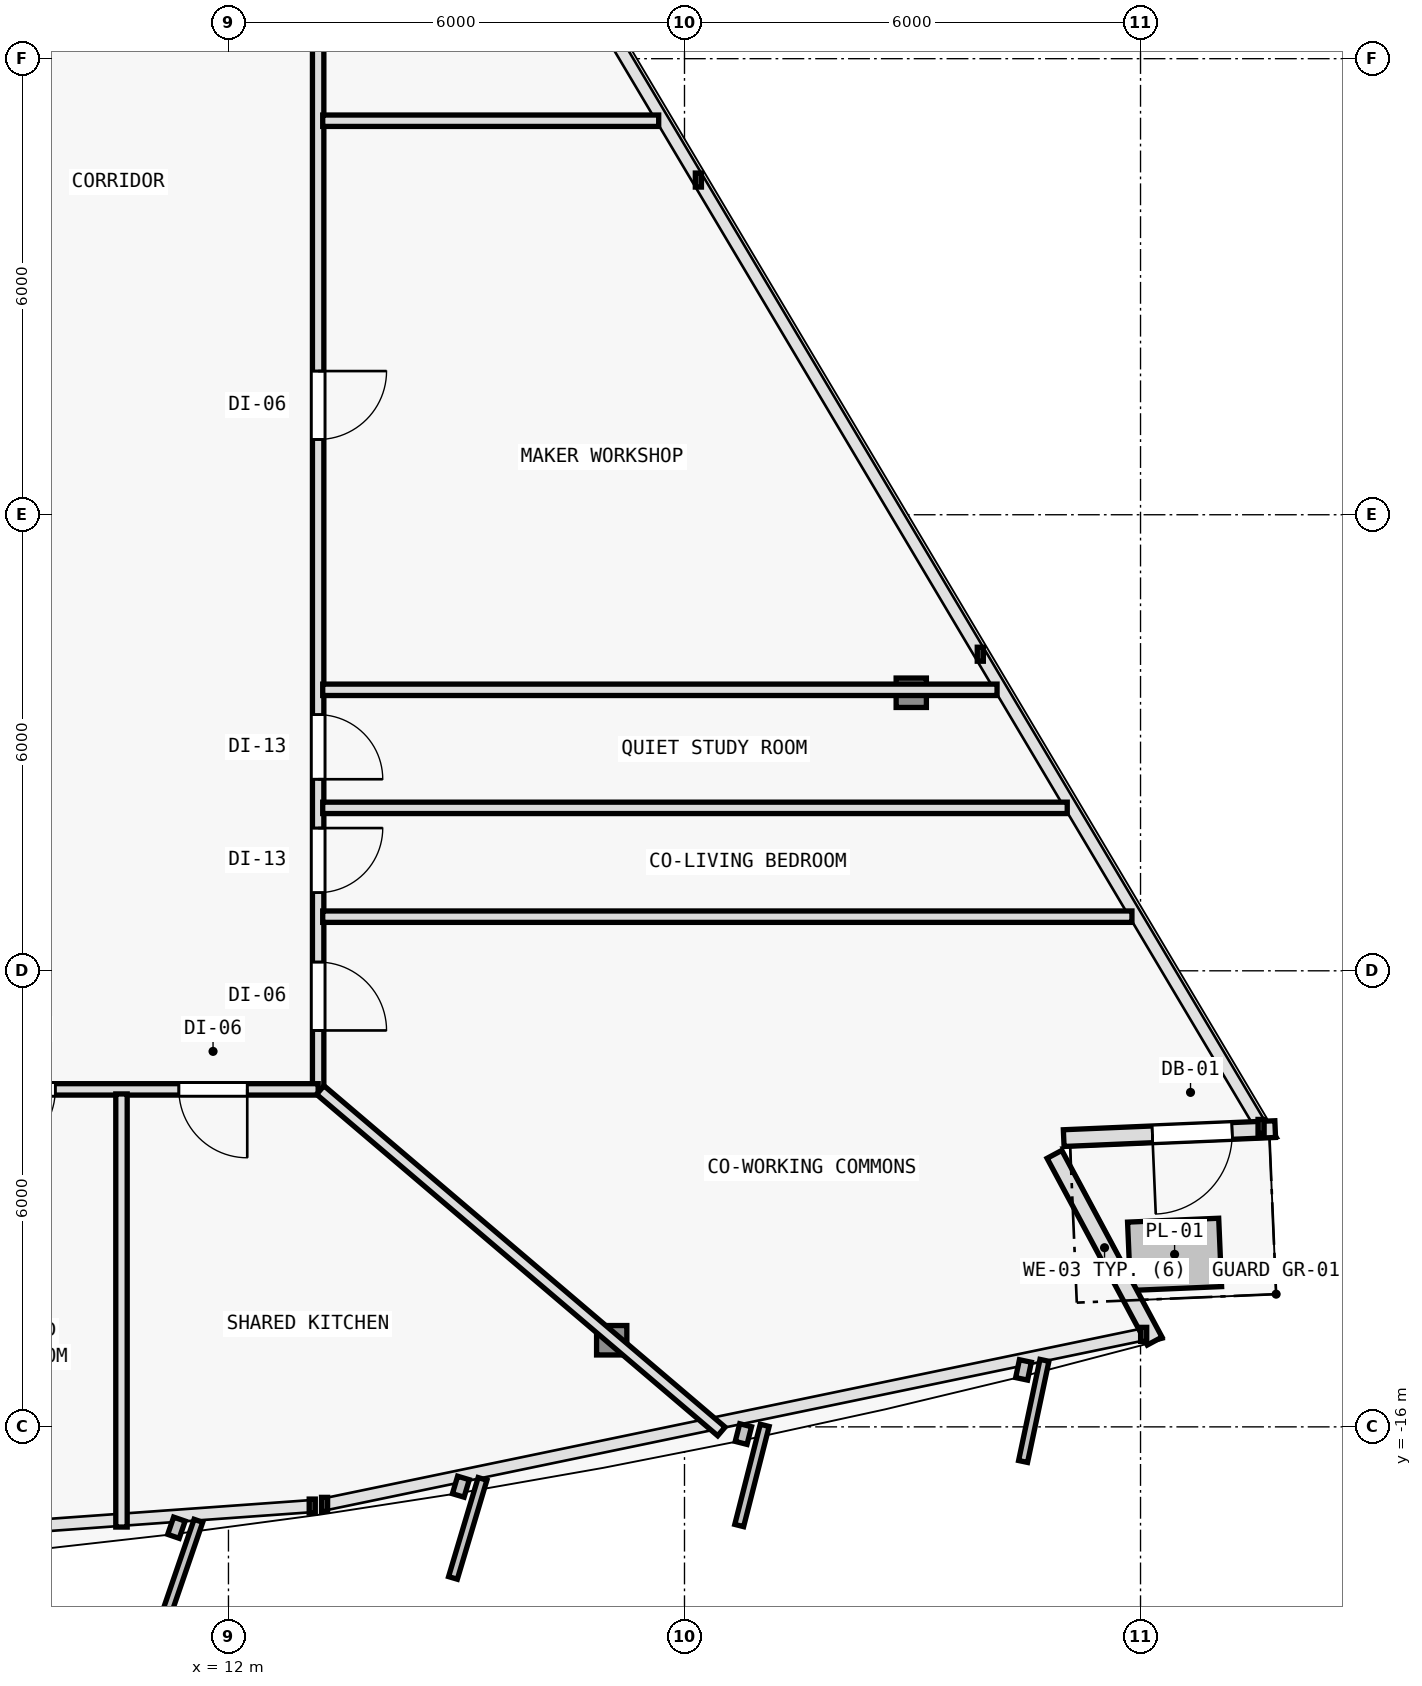
"""IFC4 building model, lengths in metres.
Left out: names, types, materials, properties, quantities, classifications, styles, units other than length and angle.
Written with IfcOpenShell. Run it as: python <this file> out.ifc"""

import sys

from ifc_helpers import new_model, si_unit, direction, frame, frame_2d, origin, origin_2d, place, context, subcontext, project, spatial, rectangle, i_section, extrude, element, fill, save


model = new_model("IFC4")
c1 = context("Model", 3, precision=1e-05, world=origin(), true_north=direction((0.0, 1.0)))
c2 = subcontext(c1, "Body", "Model", "MODEL_VIEW")
j1 = project(units=[si_unit("LENGTHUNIT", "METRE"), si_unit("PLANEANGLEUNIT", "RADIAN")], contexts=[c1])
p1 = place(None, origin())
s1 = spatial("IfcSite", under=j1, at=p1, CompositionType="ELEMENT")
p2 = place(p1, origin())
s2 = spatial("IfcBuilding", under=s1, at=p2, CompositionType="ELEMENT")
p3 = place(p2, frame((0.0, 0.0, 194.7)))
s3 = spatial("IfcBuildingStorey", under=s2, at=p3, CompositionType="ELEMENT", Elevation=194.7)
p4 = place(p3, frame((17.042, -14.86, 0.006), z_axis=(-0.020596292833, 0.033511459955, 0.999226087917), x_axis=(-0.851954850327, -0.523615252838, 0.0)))
e1 = element("IfcColumn", 1, at=p4, inside=s3, PredefinedType="COLUMN", context=c2, shape_type="SweptSolid", body=[
    extrude(i_section(OverallWidth=0.398, OverallDepth=0.387, WebThickness=0.013, FlangeThickness=0.022, FilletRadius=0.015, at=origin_2d()), origin(), (0.0, 0.0, 1.0), 3.592),
])
p5 = place(p3, frame((20.984, -6.342, 0.006), z_axis=(-0.026107436898, 0.021620221181, 0.999425318758), x_axis=(-0.637813971185, -0.770190455771, 0.0)))
e2 = element("IfcColumn", 2, at=p5, inside=s3, PredefinedType="COLUMN", context=c2, shape_type="SweptSolid", body=[
    extrude(i_section(OverallWidth=0.398, OverallDepth=0.387, WebThickness=0.013, FlangeThickness=0.022, FilletRadius=0.015, at=origin_2d()), origin(), (0.0, 0.0, 1.0), 3.591),
])
p6 = place(p3, frame((22.868, -12.415, 0.0), z_axis=(0.0, 0.0, 1.0), x_axis=(0.472845900162, -0.881145138272, 0.0)))
e3 = element("IfcWall", 3, at=p6, inside=s3, PredefinedType="SOLIDWALL", context=c2, shape_type="SweptSolid", body=[
    extrude(rectangle(XDim=2.788, YDim=0.22, at=frame_2d((1.394, 0.0))), origin(), (0.0, 0.0, 1.0), 3.35),
])
p7 = place(p3, frame((25.772, -12.083, 0.0), z_axis=(0.0, 0.0, 1.0), x_axis=(-0.999095761456, -0.042516578425, 0.0)))
e4 = element("IfcWall", 4, at=p7, inside=s3, PredefinedType="SOLIDWALL", context=c2, shape_type="SweptSolid", body=[
    extrude(rectangle(XDim=2.785, YDim=0.22, at=frame_2d((1.393, 0.0))), origin(), (0.0, 0.0, 1.0), 3.35),
])
p8 = place(p7, frame((0.567, 0.0, 0.0)))
e5 = element("IfcOpeningElement", 5, at=p8, cuts=e4, PredefinedType="OPENING", context=c2, shape_type="SweptSolid", body=[
    extrude(rectangle(XDim=1.05, YDim=2.15, at=frame_2d((0.525, 1.075))), frame((0.0, 0.12, 0.0), z_axis=(0.0, -1.0, 0.0), x_axis=(1.0, 0.0, 0.0)), (0.0, 0.0, 1.0), 0.24),
])
p9 = place(p3, frame((13.18, 8.444, 0.0), z_axis=(0.0, 0.0, 1.0), x_axis=(0.0, -1.0, 0.0)))
e6 = element("IfcWall", 6, at=p9, inside=s3, PredefinedType="PARTITIONING", context=c2, shape_type="SweptSolid", body=[
    extrude(rectangle(XDim=20.004, YDim=0.15, at=frame_2d((10.002, 0.0))), origin(), (0.0, 0.0, 1.0), 2.825),
])
p10 = place(p9, frame((18.329, 0.0, 0.0)))
e7 = element("IfcOpeningElement", 7, at=p10, cuts=e6, PredefinedType="OPENING", context=c2, shape_type="SweptSolid", body=[
    extrude(rectangle(XDim=0.9, YDim=2.1, at=frame_2d((0.45, 1.05))), frame((0.0, 0.085, 0.0), z_axis=(0.0, -1.0, 0.0), x_axis=(1.0, 0.0, 0.0)), (0.0, 0.0, 1.0), 0.17),
])
p11 = place(p9, frame((16.566, 0.0, 0.0)))
e8 = element("IfcOpeningElement", 8, at=p11, cuts=e6, PredefinedType="OPENING", context=c2, shape_type="SweptSolid", body=[
    extrude(rectangle(XDim=0.85, YDim=2.1, at=frame_2d((0.425, 1.05))), frame((0.0, 0.085, 0.0), z_axis=(0.0, -1.0, 0.0), x_axis=(1.0, 0.0, 0.0)), (0.0, 0.0, 1.0), 0.17),
])
p12 = place(p9, frame((15.074, 0.0, 0.0)))
e9 = element("IfcOpeningElement", 9, at=p12, cuts=e6, PredefinedType="OPENING", context=c2, shape_type="SweptSolid", body=[
    extrude(rectangle(XDim=0.85, YDim=2.1, at=frame_2d((0.425, 1.05))), frame((0.0, 0.085, 0.0), z_axis=(0.0, -1.0, 0.0), x_axis=(1.0, 0.0, 0.0)), (0.0, 0.0, 1.0), 0.17),
])
p13 = place(p9, frame((10.554, 0.0, 0.0)))
e10 = element("IfcOpeningElement", 10, at=p13, cuts=e6, PredefinedType="OPENING", context=c2, shape_type="SweptSolid", body=[
    extrude(rectangle(XDim=0.9, YDim=2.1, at=frame_2d((0.45, 1.05))), frame((0.0, 0.085, 0.0), z_axis=(0.0, -1.0, 0.0), x_axis=(1.0, 0.0, 0.0)), (0.0, 0.0, 1.0), 0.17),
])
p14 = place(p3, frame((13.18, -11.56, 0.0), z_axis=(0.0, 0.0, 1.0), x_axis=(-1.0, 0.0, 0.0)))
e11 = element("IfcWall", 11, at=p14, inside=s3, PredefinedType="PARTITIONING", context=c2, shape_type="SweptSolid", body=[
    extrude(rectangle(XDim=23.04, YDim=0.15, at=frame_2d((11.52, 0.0))), origin(), (0.0, 0.0, 1.0), 2.825),
])
p15 = place(p14, frame((14.399, 0.0, 0.0)))
e12 = element("IfcOpeningElement", 12, at=p15, cuts=e11, PredefinedType="OPENING", context=c2, shape_type="SweptSolid", body=[
    extrude(rectangle(XDim=0.9, YDim=2.1, at=frame_2d((0.45, 1.05))), frame((0.0, 0.085, 0.0), z_axis=(0.0, -1.0, 0.0), x_axis=(1.0, 0.0, 0.0)), (0.0, 0.0, 1.0), 0.17),
])
p16 = place(p14, frame((5.905, 0.0, 0.0)))
e13 = element("IfcOpeningElement", 13, at=p16, cuts=e11, PredefinedType="OPENING", context=c2, shape_type="SweptSolid", body=[
    extrude(rectangle(XDim=0.9, YDim=2.1, at=frame_2d((0.45, 1.05))), frame((0.0, 0.085, 0.0), z_axis=(0.0, -1.0, 0.0), x_axis=(1.0, 0.0, 0.0)), (0.0, 0.0, 1.0), 0.17),
])
p17 = place(p14, frame((3.458, 0.0, 0.0)))
e14 = element("IfcOpeningElement", 14, at=p17, cuts=e11, PredefinedType="OPENING", context=c2, shape_type="SweptSolid", body=[
    extrude(rectangle(XDim=0.9, YDim=2.1, at=frame_2d((0.45, 1.05))), frame((0.0, 0.085, 0.0), z_axis=(0.0, -1.0, 0.0), x_axis=(1.0, 0.0, 0.0)), (0.0, 0.0, 1.0), 0.17),
])
p18 = place(p14, frame((0.933, 0.0, 0.0)))
e15 = element("IfcOpeningElement", 15, at=p18, cuts=e11, PredefinedType="OPENING", context=c2, shape_type="SweptSolid", body=[
    extrude(rectangle(XDim=0.9, YDim=2.1, at=frame_2d((0.45, 1.05))), frame((0.0, 0.085, 0.0), z_axis=(0.0, -1.0, 0.0), x_axis=(1.0, 0.0, 0.0)), (0.0, 0.0, 1.0), 0.17),
])
p19 = place(p3, frame((13.208, -11.569, 0.0), z_axis=(0.0, 0.0, 1.0), x_axis=(0.761564546723, -0.648089068859, 0.0)))
e16 = element("IfcWall", 16, at=p19, inside=s3, PredefinedType="PARTITIONING", context=c2, shape_type="SweptSolid", body=[
    extrude(rectangle(XDim=6.93, YDim=0.15, at=frame_2d((3.465, 0.0))), origin(), (0.0, 0.0, 1.0), 2.825),
])
p20 = place(p3, frame((13.24, -6.303, 0.0), z_axis=(0.0, 0.0, 1.0), x_axis=(1.0, 0.0, 0.0)))
e17 = element("IfcWall", 17, at=p20, inside=s3, PredefinedType="PARTITIONING", context=c2, shape_type="SweptSolid", body=[
    extrude(rectangle(XDim=8.872, YDim=0.15, at=frame_2d((4.436, 0.0))), origin(), (0.0, 0.0, 1.0), 2.825),
])
p21 = place(p3, frame((10.593, -11.62, 0.0), z_axis=(0.0, 0.0, 1.0), x_axis=(0.0, -1.0, 0.0)))
e18 = element("IfcWall", 18, at=p21, inside=s3, PredefinedType="PARTITIONING", context=c2, shape_type="SweptSolid", body=[
    extrude(rectangle(XDim=5.698, YDim=0.15, at=frame_2d((2.849, 0.0))), origin(), (0.0, 0.0, 1.0), 2.775),
])
p22 = place(p3, frame((13.24, -9.288, 0.0), z_axis=(0.0, 0.0, 1.0), x_axis=(1.0, 0.0, 0.0)))
e19 = element("IfcWall", 19, at=p22, inside=s3, PredefinedType="PARTITIONING", context=c2, shape_type="SweptSolid", body=[
    extrude(rectangle(XDim=10.647, YDim=0.15, at=frame_2d((5.324, 0.0))), origin(), (0.0, 0.0, 1.0), 2.935),
])
p23 = place(p3, frame((13.24, -7.856, 0.0), z_axis=(0.0, 0.0, 1.0), x_axis=(1.0, 0.0, 0.0)))
e20 = element("IfcWall", 20, at=p23, inside=s3, PredefinedType="PARTITIONING", context=c2, shape_type="SweptSolid", body=[
    extrude(rectangle(XDim=9.796, YDim=0.15, at=frame_2d((4.898, 0.0))), origin(), (0.0, 0.0, 1.0), 2.825),
])
p24 = place(p3, frame((13.24, 1.184, 0.0), z_axis=(0.0, 0.0, 1.0), x_axis=(1.0, 0.0, 0.0)))
e21 = element("IfcWall", 21, at=p24, inside=s3, PredefinedType="PARTITIONING", context=c2, shape_type="SweptSolid", body=[
    extrude(rectangle(XDim=4.42, YDim=0.15, at=frame_2d((2.21, 0.0))), origin(), (0.0, 0.0, 1.0), 2.935),
])
p25 = place(p8, origin())
e22 = element("IfcDoor", 22, at=p25, inside=s3, OperationType="SINGLE_SWING_RIGHT", PredefinedType="DOOR", context=c2, shape_type="SweptSolid", body=[
    extrude(rectangle(XDim=1.05, YDim=2.15, at=frame_2d((0.525, 1.075))), frame((0.0, 0.025, 0.0), z_axis=(0.0, -1.0, 0.0), x_axis=(1.0, 0.0, 0.0)), (0.0, 0.0, 1.0), 0.05),
])
fill(e5, e22)
p26 = place(p17, origin())
e23 = element("IfcDoor", 23, at=p26, inside=s3, OperationType="SINGLE_SWING_RIGHT", PredefinedType="DOOR", context=c2, shape_type="SweptSolid", body=[
    extrude(rectangle(XDim=0.9, YDim=2.1, at=frame_2d((0.45, 1.05))), frame((0.0, 0.025, 0.0), z_axis=(0.0, -1.0, 0.0), x_axis=(1.0, 0.0, 0.0)), (0.0, 0.0, 1.0), 0.05),
])
fill(e14, e23)
p27 = place(p18, origin())
e24 = element("IfcDoor", 24, at=p27, inside=s3, OperationType="SINGLE_SWING_LEFT", PredefinedType="DOOR", context=c2, shape_type="SweptSolid", body=[
    extrude(rectangle(XDim=0.9, YDim=2.1, at=frame_2d((0.45, 1.05))), frame((0.0, 0.025, 0.0), z_axis=(0.0, -1.0, 0.0), x_axis=(1.0, 0.0, 0.0)), (0.0, 0.0, 1.0), 0.05),
])
fill(e15, e24)
p28 = place(p10, origin())
e25 = element("IfcDoor", 25, at=p28, inside=s3, OperationType="SINGLE_SWING_RIGHT", PredefinedType="DOOR", context=c2, shape_type="SweptSolid", body=[
    extrude(rectangle(XDim=0.9, YDim=2.1, at=frame_2d((0.45, 1.05))), frame((0.0, 0.025, 0.0), z_axis=(0.0, -1.0, 0.0), x_axis=(1.0, 0.0, 0.0)), (0.0, 0.0, 1.0), 0.05),
])
fill(e7, e25)
p29 = place(p11, origin())
e26 = element("IfcDoor", 26, at=p29, inside=s3, OperationType="SINGLE_SWING_LEFT", PredefinedType="DOOR", context=c2, shape_type="SweptSolid", body=[
    extrude(rectangle(XDim=0.85, YDim=2.1, at=frame_2d((0.425, 1.05))), frame((0.0, 0.025, 0.0), z_axis=(0.0, -1.0, 0.0), x_axis=(1.0, 0.0, 0.0)), (0.0, 0.0, 1.0), 0.05),
])
fill(e8, e26)
p30 = place(p12, origin())
e27 = element("IfcDoor", 27, at=p30, inside=s3, OperationType="SINGLE_SWING_RIGHT", PredefinedType="DOOR", context=c2, shape_type="SweptSolid", body=[
    extrude(rectangle(XDim=0.85, YDim=2.1, at=frame_2d((0.425, 1.05))), frame((0.0, 0.025, 0.0), z_axis=(0.0, -1.0, 0.0), x_axis=(1.0, 0.0, 0.0)), (0.0, 0.0, 1.0), 0.05),
])
fill(e9, e27)
p31 = place(p13, origin())
e28 = element("IfcDoor", 28, at=p31, inside=s3, OperationType="SINGLE_SWING_LEFT", PredefinedType="DOOR", context=c2, shape_type="SweptSolid", body=[
    extrude(rectangle(XDim=0.9, YDim=2.1, at=frame_2d((0.45, 1.05))), frame((0.0, 0.025, 0.0), z_axis=(0.0, -1.0, 0.0), x_axis=(1.0, 0.0, 0.0)), (0.0, 0.0, 1.0), 0.05),
])
fill(e10, e28)
save(model, sys.argv[1])
